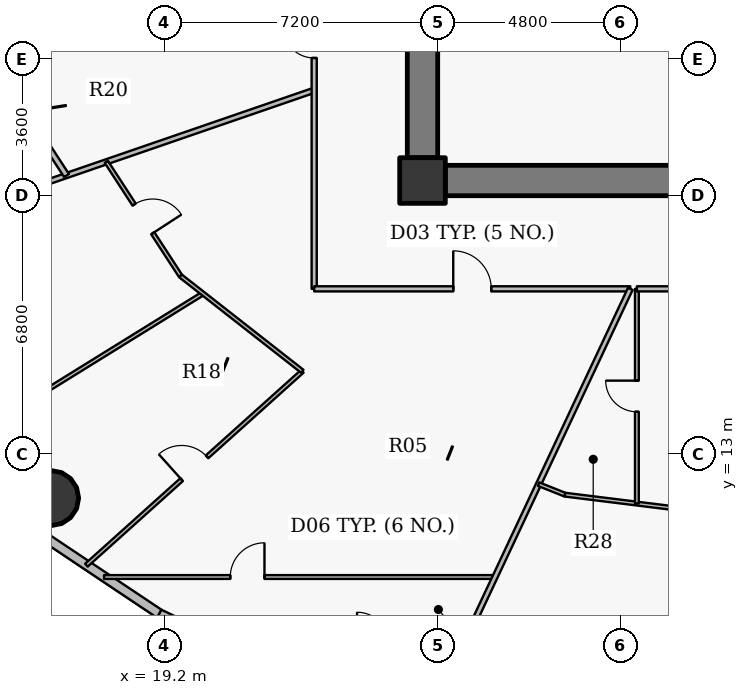
"""IFC4 building model, lengths in metres.
Left out: names, types, materials, properties, quantities, classifications, styles, units other than length and angle.
Written with IfcOpenShell. Run it as: python <this file> out.ifc"""

import sys

from ifc_helpers import new_model, si_unit, direction, frame, frame_2d, origin, origin_2d, place, context, subcontext, project, spatial, rectangle, hollow_circle, extrude, source, transform, mapped, element, fill, save


model = new_model("IFC4")
c1 = context("Model", 3, precision=1e-05, world=origin(), true_north=direction((0.0, 1.0)))
c2 = subcontext(c1, "Body", "Model", "MODEL_VIEW")
j1 = project(units=[si_unit("LENGTHUNIT", "METRE"), si_unit("PLANEANGLEUNIT", "RADIAN")], contexts=[c1])
p1 = place(None, origin())
s1 = spatial("IfcSite", under=j1, at=p1, CompositionType="ELEMENT")
p2 = place(p1, origin())
s2 = spatial("IfcBuilding", under=s1, at=p2, CompositionType="ELEMENT")
p3 = place(p2, frame((0.0, 0.0, 134.7)))
s3 = spatial("IfcBuildingStorey", under=s2, at=p3, CompositionType="ELEMENT", Elevation=134.7)
p4 = place(p3, frame((26.0, 20.2, 0.0), z_axis=(0.0, 0.0, 1.0), x_axis=(1.0, 0.0, 0.0)))
e1 = element("IfcColumn", 1, at=p4, inside=s3, PredefinedType="COLUMN", context=c2, shape_type="SweptSolid", body=[
    extrude(rectangle(XDim=1.2, YDim=1.2, at=origin_2d()), origin(), (0.0, 0.0, 1.0), 3.75),
])
p5 = place(p3, frame((45.4, 20.2, 0.0), z_axis=(0.0, 0.0, 1.0), x_axis=(-1.0, 0.0, 0.0)))
e2 = element("IfcWall", 2, at=p5, inside=s3, PredefinedType="SHEAR", context=c2, shape_type="SweptSolid", body=[
    extrude(rectangle(XDim=18.8, YDim=0.8, at=frame_2d((9.4, 0.0))), origin(), (0.0, 0.0, 1.0), 2.95),
])
p6 = place(p5, frame((10.15, 0.0, 0.0)))
e3 = element("IfcOpeningElement", 3, at=p6, cuts=e2, PredefinedType="OPENING", context=c2, shape_type="SweptSolid", body=[
    extrude(rectangle(XDim=1.15, YDim=2.15, at=origin_2d()), frame((0.575, 0.41, 1.075), z_axis=(0.0, -1.0, 0.0), x_axis=(1.0, 0.0, 0.0)), (0.0, 0.0, 1.0), 0.82),
])
p7 = place(p3, frame((26.0, 20.8, 0.0), z_axis=(0.0, 0.0, 1.0), x_axis=(0.0, 1.0, 0.0)))
e4 = element("IfcWall", 4, at=p7, inside=s3, PredefinedType="SHEAR", context=c2, shape_type="SweptSolid", body=[
    extrude(rectangle(XDim=12.4, YDim=0.8, at=frame_2d((6.2, 0.0))), origin(), (0.0, 0.0, 1.0), 2.95),
])
p8 = place(p7, frame((5.79, 0.0, 0.0)))
e5 = element("IfcOpeningElement", 5, at=p8, cuts=e4, PredefinedType="OPENING", context=c2, shape_type="SweptSolid", body=[
    extrude(rectangle(XDim=0.82, YDim=2.1, at=origin_2d()), frame((0.41, 0.41, 1.05), z_axis=(0.0, -1.0, 0.0), x_axis=(1.0, 0.0, 0.0)), (0.0, 0.0, 1.0), 0.82),
])
p9 = place(p3, frame((16.227, 11.844, 0.0), z_axis=(0.0, 0.0, 1.0), x_axis=(1.0, 0.0, 0.0)))
e6 = element("IfcColumn", 6, at=p9, inside=s3, PredefinedType="COLUMN", context=c2, shape_type="SweptSolid", body=[
    extrude(hollow_circle(Radius=0.725, WallThickness=0.042, at=origin_2d()), origin(), (0.0, 0.0, 1.0), 3.75),
])
p10 = place(p3, frame((19.075, 8.801, 0.0), z_axis=(0.0, 0.0, 1.0), x_axis=(-0.831221811447, 0.555940914284, 0.0)))
e7 = element("IfcWall", 7, at=p10, inside=s3, PredefinedType="SOLIDWALL", context=c2, shape_type="SweptSolid", body=[
    extrude(rectangle(XDim=4.13, YDim=0.24, at=frame_2d((2.065, 0.0))), origin(), (0.0, 0.0, 1.0), 3.5),
])
p11 = place(p3, frame((22.926, 6.953, 0.0), z_axis=(0.0, 0.0, 1.0), x_axis=(-0.901589935876, 0.432591709962, 0.0)))
e8 = element("IfcWall", 8, at=p11, inside=s3, PredefinedType="SOLIDWALL", context=c2, shape_type="SweptSolid", body=[
    extrude(rectangle(XDim=4.272, YDim=0.24, at=frame_2d((2.136, 0.0))), origin(), (0.0, 0.0, 1.0), 3.5),
])
p12 = place(p3, frame((7.779, 22.812, 0.0), z_axis=(0.0, 0.0, 1.0), x_axis=(0.989169524168, 0.146777561148, 0.0)))
e9 = element("IfcWall", 9, at=p12, inside=s3, PredefinedType="PARTITIONING", context=c2, shape_type="SweptSolid", body=[
    extrude(rectangle(XDim=15.539, YDim=0.15, at=frame_2d((7.77, 0.0))), origin(), (0.0, 0.0, 1.0), 2.935),
])
p13 = place(p12, frame((3.265, 0.0, 0.0)))
e10 = element("IfcOpeningElement", 10, at=p13, cuts=e9, PredefinedType="OPENING", context=c2, shape_type="SweptSolid", body=[
    extrude(rectangle(XDim=1.05, YDim=2.15, at=origin_2d()), frame((0.525, 0.085, 1.075), z_axis=(0.0, -1.0, 0.0), x_axis=(1.0, 0.0, 0.0)), (0.0, 0.0, 1.0), 0.17),
])
p14 = place(p3, frame((9.735, 17.956, 0.0), z_axis=(0.0, 0.0, 1.0), x_axis=(0.945515704768, 0.325576491836, 0.0)))
e11 = element("IfcWall", 11, at=p14, inside=s3, PredefinedType="PARTITIONING", context=c2, shape_type="SweptSolid", body=[
    extrude(rectangle(XDim=14.188, YDim=0.135, at=frame_2d((7.094, 0.0))), origin(), (0.0, 0.0, 1.0), 2.935),
])
p15 = place(p3, frame((13.494, 13.059, 0.0), z_axis=(0.0, 0.0, 1.0), x_axis=(0.850110644983, 0.526604112486, 0.0)))
e12 = element("IfcWall", 12, at=p15, inside=s3, PredefinedType="PARTITIONING", context=c2, shape_type="SweptSolid", body=[
    extrude(rectangle(XDim=7.916, YDim=0.1, at=frame_2d((3.958, 0.0))), origin(), (0.0, 0.0, 1.0), 2.935),
])
p16 = place(p3, frame((15.661, 21.825, 0.0), z_axis=(0.0, 0.0, 1.0), x_axis=(0.54543603077, -0.838152454114, 0.0)))
e13 = element("IfcWall", 13, at=p16, inside=s3, PredefinedType="PARTITIONING", context=c2, shape_type="SweptSolid", body=[
    extrude(rectangle(XDim=1.782, YDim=0.15, at=frame_2d((0.891, 0.0))), origin(), (0.0, 0.0, 1.0), 2.935),
])
p17 = place(p3, frame((17.155, 10.078, 0.0), z_axis=(0.0, 0.0, 1.0), x_axis=(0.744051955022, 0.668121761528, 0.0)))
e14 = element("IfcWall", 14, at=p17, inside=s3, PredefinedType="PARTITIONING", context=c2, shape_type="SweptSolid", body=[
    extrude(rectangle(XDim=7.636, YDim=0.1, at=frame_2d((3.818, 0.0))), origin(), (0.0, 0.0, 1.0), 2.935),
])
p18 = place(p17, frame((3.368, 0.0, 0.0)))
e15 = element("IfcOpeningElement", 15, at=p18, cuts=e14, PredefinedType="OPENING", context=c2, shape_type="SweptSolid", body=[
    extrude(rectangle(XDim=0.9, YDim=2.1, at=origin_2d()), frame((0.45, 0.06, 1.05), z_axis=(0.0, -1.0, 0.0), x_axis=(1.0, 0.0, 0.0)), (0.0, 0.0, 1.0), 0.12),
])
p19 = place(p3, frame((17.62, 9.768, 0.0), z_axis=(0.0, 0.0, 1.0), x_axis=(1.0, 0.0, 0.0)))
e16 = element("IfcWall", 16, at=p19, inside=s3, PredefinedType="PARTITIONING", context=c2, shape_type="SweptSolid", body=[
    extrude(rectangle(XDim=10.288, YDim=0.1, at=frame_2d((5.144, 0.0))), origin(), (0.0, 0.0, 1.0), 2.935),
])
p20 = place(p19, frame((3.322, 0.0, 0.0)))
e17 = element("IfcOpeningElement", 17, at=p20, cuts=e16, PredefinedType="OPENING", context=c2, shape_type="SweptSolid", body=[
    extrude(rectangle(XDim=0.9, YDim=2.1, at=origin_2d()), frame((0.45, 0.06, 1.05), z_axis=(0.0, -1.0, 0.0), x_axis=(1.0, 0.0, 0.0)), (0.0, 0.0, 1.0), 0.12),
])
p21 = place(p3, frame((17.68, 20.692, 0.0), z_axis=(0.0, 0.0, 1.0), x_axis=(0.545371539428, -0.838194418964, 0.0)))
e18 = element("IfcWall", 18, at=p21, inside=s3, PredefinedType="PARTITIONING", context=c2, shape_type="SweptSolid", body=[
    extrude(rectangle(XDim=3.583, YDim=0.1, at=frame_2d((1.791, 0.0))), origin(), (0.0, 0.0, 1.0), 3.5),
])
p22 = place(p21, frame((1.341, 0.0, 0.0)))
e19 = element("IfcOpeningElement", 19, at=p22, cuts=e18, PredefinedType="OPENING", context=c2, shape_type="SweptSolid", body=[
    extrude(rectangle(XDim=0.9, YDim=2.1, at=origin_2d()), frame((0.45, 0.06, 1.05), z_axis=(0.0, -1.0, 0.0), x_axis=(1.0, 0.0, 0.0)), (0.0, 0.0, 1.0), 0.12),
])
p23 = place(p3, frame((19.634, 17.689, 0.0), z_axis=(0.0, 0.0, 1.0), x_axis=(0.787341639438, -0.616516944461, 0.0)))
e20 = element("IfcWall", 20, at=p23, inside=s3, PredefinedType="PARTITIONING", context=c2, shape_type="SweptSolid", body=[
    extrude(rectangle(XDim=4.069, YDim=0.1, at=frame_2d((2.034, 0.0))), origin(), (0.0, 0.0, 1.0), 2.935),
])
p24 = place(p3, frame((23.15, 17.35, 0.0), z_axis=(0.0, 0.0, 1.0), x_axis=(0.0, 1.0, 0.0)))
e21 = element("IfcWall", 21, at=p24, inside=s3, PredefinedType="PARTITIONING", context=c2, shape_type="SweptSolid", body=[
    extrude(rectangle(XDim=19.3, YDim=0.135, at=frame_2d((9.65, 0.0))), origin(), (0.0, 0.0, 1.0), 2.935),
])
p25 = place(p24, frame((11.733, 0.0, 0.0)))
e22 = element("IfcOpeningElement", 22, at=p25, cuts=e21, PredefinedType="OPENING", context=c2, shape_type="SweptSolid", body=[
    extrude(rectangle(XDim=1.05, YDim=2.15, at=origin_2d()), frame((0.525, 0.078, 1.075), z_axis=(0.0, -1.0, 0.0), x_axis=(1.0, 0.0, 0.0)), (0.0, 0.0, 1.0), 0.155),
])
p26 = place(p24, frame((6.074, 0.0, 0.0)))
e23 = element("IfcOpeningElement", 23, at=p26, cuts=e21, PredefinedType="OPENING", context=c2, shape_type="SweptSolid", body=[
    extrude(rectangle(XDim=0.82, YDim=2.1, at=origin_2d()), frame((0.41, 0.078, 1.05), z_axis=(0.0, -1.0, 0.0), x_axis=(1.0, 0.0, 0.0)), (0.0, 0.0, 1.0), 0.155),
])
p27 = place(p3, frame((23.15, 17.35, 0.0), z_axis=(0.0, 0.0, 1.0), x_axis=(1.0, 0.0, 0.0)))
e24 = element("IfcWall", 24, at=p27, inside=s3, PredefinedType="PARTITIONING", context=c2, shape_type="SweptSolid", body=[
    extrude(rectangle(XDim=8.318, YDim=0.135, at=frame_2d((4.159, 0.0))), origin(), (0.0, 0.0, 1.0), 2.935),
])
p28 = place(p27, frame((3.659, 0.0, 0.0)))
e25 = element("IfcOpeningElement", 25, at=p28, cuts=e24, PredefinedType="OPENING", context=c2, shape_type="SweptSolid", body=[
    extrude(rectangle(XDim=1.0, YDim=2.15, at=origin_2d()), frame((0.5, 0.078, 1.075), z_axis=(0.0, -1.0, 0.0), x_axis=(1.0, 0.0, 0.0)), (0.0, 0.0, 1.0), 0.155),
])
p29 = place(p3, frame((26.1, 5.918, 0.0), z_axis=(0.0, 0.0, 1.0), x_axis=(0.425072644526, 0.905159238408, 0.0)))
e26 = element("IfcWall", 26, at=p29, inside=s3, PredefinedType="PARTITIONING", context=c2, shape_type="SweptSolid", body=[
    extrude(rectangle(XDim=12.63, YDim=0.135, at=frame_2d((6.315, 0.0))), origin(), (0.0, 0.0, 1.0), 2.935),
])
p30 = place(p3, frame((29.055, 12.211, 0.0), z_axis=(0.0, 0.0, 1.0), x_axis=(0.928859514795, -0.370432182423, 0.0)))
e27 = element("IfcWall", 27, at=p30, inside=s3, PredefinedType="PARTITIONING", context=c2, shape_type="SweptSolid", body=[
    extrude(rectangle(XDim=0.747, YDim=0.1, at=frame_2d((0.374, 0.0))), origin(), (0.0, 0.0, 1.0), 3.5),
])
p31 = place(p3, frame((29.749, 11.934, 0.0), z_axis=(0.0, 0.0, 1.0), x_axis=(0.992395485088, -0.123090215599, 0.0)))
e28 = element("IfcWall", 28, at=p31, inside=s3, PredefinedType="PARTITIONING", context=c2, shape_type="SweptSolid", body=[
    extrude(rectangle(XDim=6.299, YDim=0.1, at=frame_2d((3.15, 0.0))), origin(), (0.0, 0.0, 1.0), 2.935),
])
p32 = place(p31, frame((2.905, 0.0, 0.0)))
e29 = element("IfcOpeningElement", 29, at=p32, cuts=e28, PredefinedType="OPENING", context=c2, shape_type="SweptSolid", body=[
    extrude(rectangle(XDim=0.9, YDim=2.1, at=origin_2d()), frame((0.45, 0.06, 1.05), z_axis=(0.0, -1.0, 0.0), x_axis=(1.0, 0.0, 0.0)), (0.0, 0.0, 1.0), 0.12),
])
p33 = place(p3, frame((31.641, 11.7, 0.0), z_axis=(0.0, 0.0, 1.0), x_axis=(0.0, 1.0, 0.0)))
e30 = element("IfcWall", 30, at=p33, inside=s3, PredefinedType="PARTITIONING", context=c2, shape_type="SweptSolid", body=[
    extrude(rectangle(XDim=5.65, YDim=0.1, at=frame_2d((2.825, 0.0))), origin(), (0.0, 0.0, 1.0), 3.5),
])
p34 = place(p33, frame((2.415, 0.0, 0.0)))
e31 = element("IfcOpeningElement", 31, at=p34, cuts=e30, PredefinedType="OPENING", context=c2, shape_type="SweptSolid", body=[
    extrude(rectangle(XDim=0.82, YDim=2.1, at=origin_2d()), frame((0.41, 0.06, 1.05), z_axis=(0.0, -1.0, 0.0), x_axis=(1.0, 0.0, 0.0)), (0.0, 0.0, 1.0), 0.12),
])
p35 = place(p3, frame((31.641, 17.35, 0.0), z_axis=(0.0, 0.0, 1.0), x_axis=(1.0, 0.0, 0.0)))
e32 = element("IfcWall", 32, at=p35, inside=s3, PredefinedType="PARTITIONING", context=c2, shape_type="SweptSolid", body=[
    extrude(rectangle(XDim=1.882, YDim=0.135, at=frame_2d((0.941, 0.0))), origin(), (0.0, 0.0, 1.0), 3.5),
])
p36 = place(p3, frame((25.6, 20.79, 0.0), z_axis=(0.0, 0.0, 1.0), x_axis=(0.0, -1.0, 0.0)))
e33 = element("IfcWall", 33, at=p36, inside=s3, PredefinedType="PARTITIONING", context=c2, shape_type="SweptSolid", body=[
    extrude(rectangle(XDim=0.99, YDim=0.135, at=frame_2d((0.495, 0.0))), origin(), (0.0, 0.0, 1.0), 3.5),
])
p37 = place(p3, frame((25.907, 19.8, 0.0), z_axis=(0.0, 0.0, 1.0), x_axis=(1.0, 0.0, 0.0)))
e34 = element("IfcWall", 34, at=p37, inside=s3, PredefinedType="PARTITIONING", context=c2, shape_type="SweptSolid", body=[
    extrude(rectangle(XDim=0.683, YDim=0.135, at=frame_2d((0.341, 0.0))), origin(), (0.0, 0.0, 1.0), 2.935),
])
m1 = source(origin(), c2, "Body", "SweptSolid", [
    extrude(rectangle(XDim=1.0, YDim=2.15, at=origin_2d()), frame((0.5, 0.025, 1.075), z_axis=(0.0, -1.0, 0.0), x_axis=(1.0, 0.0, 0.0)), (0.0, 0.0, 1.0), 0.05),
])
p38 = place(p28, origin())
e35 = element("IfcDoor", 35, at=p38, inside=s3, OperationType="SINGLE_SWING_LEFT", PredefinedType="DOOR", context=c2, shape_type="MappedRepresentation", body=[
    mapped(m1, transform((0.0, 0.0, 0.0), x_axis=(1.0, 0.0, 0.0), y_axis=(0.0, 1.0, 0.0), z_axis=(0.0, 0.0, 1.0), scale=1.0)),
])
fill(e25, e35)
m2 = source(origin(), c2, "Body", "SweptSolid", [
    extrude(rectangle(XDim=0.9, YDim=2.1, at=origin_2d()), frame((0.45, 0.025, 1.05), z_axis=(0.0, -1.0, 0.0), x_axis=(1.0, 0.0, 0.0)), (0.0, 0.0, 1.0), 0.05),
])
p39 = place(p22, origin())
e36 = element("IfcDoor", 36, at=p39, inside=s3, OperationType="SINGLE_SWING_RIGHT", PredefinedType="DOOR", context=c2, shape_type="MappedRepresentation", body=[
    mapped(m2, transform((0.0, 0.0, 0.0), x_axis=(1.0, 0.0, 0.0), y_axis=(0.0, 1.0, 0.0), z_axis=(0.0, 0.0, 1.0), scale=1.0)),
])
fill(e19, e36)
p40 = place(p18, origin())
e37 = element("IfcDoor", 37, at=p40, inside=s3, OperationType="SINGLE_SWING_LEFT", PredefinedType="DOOR", context=c2, shape_type="MappedRepresentation", body=[
    mapped(m2, transform((0.0, 0.0, 0.0), x_axis=(1.0, 0.0, 0.0), y_axis=(0.0, 1.0, 0.0), z_axis=(0.0, 0.0, 1.0), scale=1.0)),
])
fill(e15, e37)
p41 = place(p20, origin())
e38 = element("IfcDoor", 38, at=p41, inside=s3, OperationType="SINGLE_SWING_RIGHT", PredefinedType="DOOR", context=c2, shape_type="MappedRepresentation", body=[
    mapped(m2, transform((0.0, 0.0, 0.0), x_axis=(1.0, 0.0, 0.0), y_axis=(0.0, 1.0, 0.0), z_axis=(0.0, 0.0, 1.0), scale=1.0)),
])
fill(e17, e38)
m3 = source(origin(), c2, "Body", "SweptSolid", [
    extrude(rectangle(XDim=0.82, YDim=2.1, at=origin_2d()), frame((0.41, 0.025, 1.05), z_axis=(0.0, -1.0, 0.0), x_axis=(1.0, 0.0, 0.0)), (0.0, 0.0, 1.0), 0.05),
])
p42 = place(p34, origin())
e39 = element("IfcDoor", 39, at=p42, inside=s3, OperationType="SINGLE_SWING_RIGHT", PredefinedType="DOOR", context=c2, shape_type="MappedRepresentation", body=[
    mapped(m3, transform((0.0, 0.0, 0.0), x_axis=(1.0, 0.0, 0.0), y_axis=(0.0, 1.0, 0.0), z_axis=(0.0, 0.0, 1.0), scale=1.0)),
])
fill(e31, e39)
p43 = place(p26, origin())
e40 = element("IfcDoor", 40, at=p43, inside=s3, OperationType="SINGLE_SWING_RIGHT", PredefinedType="DOOR", context=c2, shape_type="MappedRepresentation", body=[
    mapped(m3, transform((0.0, 0.0, 0.0), x_axis=(1.0, 0.0, 0.0), y_axis=(0.0, 1.0, 0.0), z_axis=(0.0, 0.0, 1.0), scale=1.0)),
])
fill(e23, e40)
save(model, sys.argv[1])
